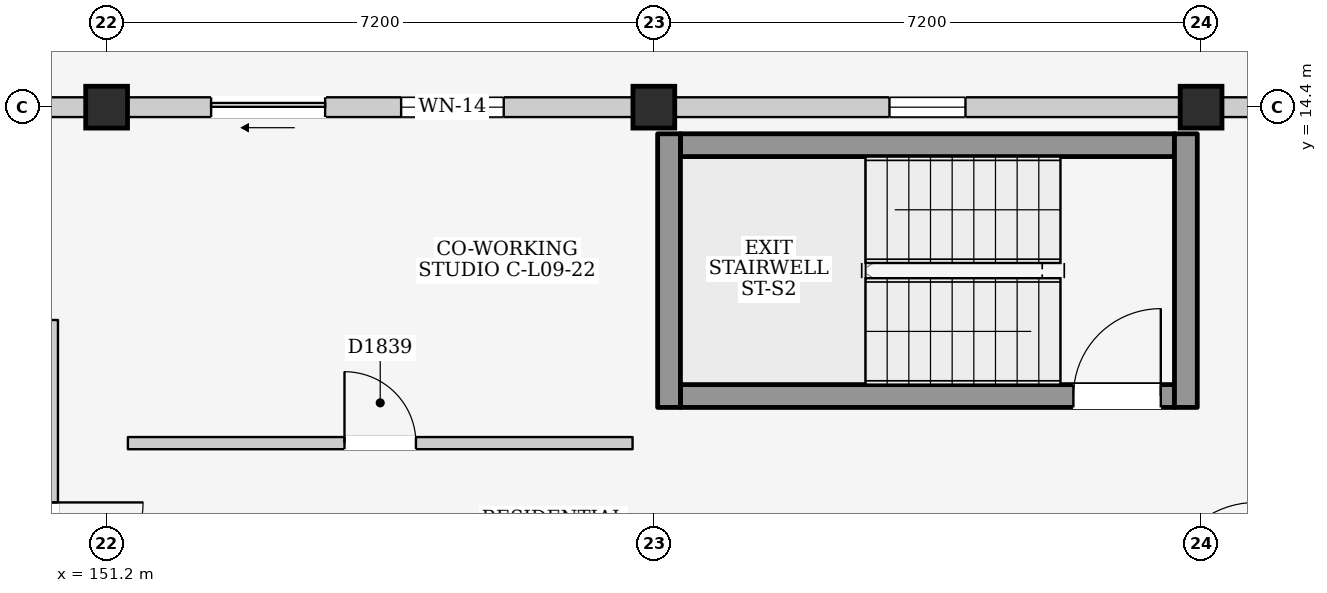
"""IFC4 building model, lengths in metres.
Left out: names, types, materials, properties, quantities, classifications, styles, units other than length and angle.
Written with IfcOpenShell. Run it as: python <this file> out.ifc"""

import sys

from ifc_helpers import new_model, si_unit, direction, frame, frame_2d, origin, origin_2d, place, context, subcontext, project, spatial, rectangle, extrude, element, fill, save


model = new_model("IFC4")
c1 = context("Model", 3, precision=1e-05, world=origin(), true_north=direction((0.0, 1.0)))
c2 = subcontext(c1, "Body", "Model", "MODEL_VIEW")
j1 = project(units=[si_unit("LENGTHUNIT", "METRE"), si_unit("PLANEANGLEUNIT", "RADIAN")], contexts=[c1])
p1 = place(None, origin())
s1 = spatial("IfcSite", under=j1, at=p1, CompositionType="ELEMENT")
p2 = place(p1, origin())
s2 = spatial("IfcBuilding", under=s1, at=p2, CompositionType="ELEMENT")
p3 = place(p2, frame((0.0, 0.0, 31.5)))
s3 = spatial("IfcBuildingStorey", under=s2, at=p3, CompositionType="ELEMENT", Elevation=31.5)
for number, where, z_axis, x_axis in (
    (1, (151.2, 14.4, 0.0), (0.0, 0.0, 1.0), (1.0, 0.0, 0.0)),
    (2, (158.4, 14.4, 0.0), (0.0, 0.0, 1.0), (1.0, 0.0, 0.0)),
    (3, (165.6, 14.4, 0.0), (0.0, 0.0, 1.0), (1.0, 0.0, 0.0)),
):
    element("IfcColumn", number, at=place(p3, frame(where, z_axis=z_axis, x_axis=x_axis)), inside=s3, PredefinedType="COLUMN", context=c2, shape_type="SweptSolid", body=[
        extrude(rectangle(XDim=0.55, YDim=0.55, at=origin_2d()), origin(), (0.0, 0.0, 1.0), 3.3),
    ])
p4 = place(p3, frame((144.275, 14.4, 0.0), z_axis=(0.0, 0.0, 1.0), x_axis=(1.0, 0.0, 0.0)))
e4 = element("IfcWall", 4, at=p4, inside=s3, PredefinedType="ELEMENTEDWALL", context=c2, shape_type="SweptSolid", body=[
    extrude(rectangle(XDim=6.65, YDim=0.26, at=frame_2d((3.325, 0.0))), origin(), (0.0, 0.0, 1.0), 2.465),
])
p5 = place(p4, frame((2.825, 0.0, 1.2)))
e5 = element("IfcOpeningElement", 5, at=p5, cuts=e4, PredefinedType="OPENING", context=c2, shape_type="SweptSolid", body=[
    extrude(rectangle(XDim=1.0, YDim=0.9, at=frame_2d((0.5, 0.45))), frame((0.0, 0.145, 0.0), z_axis=(0.0, -1.0, 0.0), x_axis=(1.0, 0.0, 0.0)), (0.0, 0.0, 1.0), 0.29),
])
p6 = place(p3, frame((151.475, 14.4, 0.0), z_axis=(0.0, 0.0, 1.0), x_axis=(1.0, 0.0, 0.0)))
e6 = element("IfcWall", 6, at=p6, inside=s3, PredefinedType="ELEMENTEDWALL", context=c2, shape_type="SweptSolid", body=[
    extrude(rectangle(XDim=6.65, YDim=0.26, at=frame_2d((3.325, 0.0))), origin(), (0.0, 0.0, 1.0), 2.465),
])
p7 = place(p6, frame((1.1, 0.0, 0.0)))
e7 = element("IfcOpeningElement", 7, at=p7, cuts=e6, PredefinedType="OPENING", context=c2, shape_type="SweptSolid", body=[
    extrude(rectangle(XDim=1.5, YDim=2.12, at=frame_2d((0.75, 1.06))), frame((0.0, 0.145, 0.0), z_axis=(0.0, -1.0, 0.0), x_axis=(1.0, 0.0, 0.0)), (0.0, 0.0, 1.0), 0.29),
])
p8 = place(p6, frame((3.6, 0.0, 0.855)))
e8 = element("IfcOpeningElement", 8, at=p8, cuts=e6, PredefinedType="OPENING", context=c2, shape_type="SweptSolid", body=[
    extrude(rectangle(XDim=1.35, YDim=1.5, at=frame_2d((0.675, 0.75))), frame((0.0, 0.145, 0.0), z_axis=(0.0, -1.0, 0.0), x_axis=(1.0, 0.0, 0.0)), (0.0, 0.0, 1.0), 0.29),
])
p9 = place(p3, frame((158.675, 14.4, 0.0), z_axis=(0.0, 0.0, 1.0), x_axis=(1.0, 0.0, 0.0)))
e9 = element("IfcWall", 9, at=p9, inside=s3, PredefinedType="ELEMENTEDWALL", context=c2, shape_type="SweptSolid", body=[
    extrude(rectangle(XDim=6.65, YDim=0.26, at=frame_2d((3.325, 0.0))), origin(), (0.0, 0.0, 1.0), 2.465),
])
p10 = place(p9, frame((2.825, 0.0, 1.2)))
e10 = element("IfcOpeningElement", 10, at=p10, cuts=e9, PredefinedType="OPENING", context=c2, shape_type="SweptSolid", body=[
    extrude(rectangle(XDim=1.0, YDim=0.9, at=frame_2d((0.5, 0.45))), frame((0.0, 0.145, 0.0), z_axis=(0.0, -1.0, 0.0), x_axis=(1.0, 0.0, 0.0)), (0.0, 0.0, 1.0), 0.29),
])
p11 = place(p3, frame((165.875, 14.4, 0.0), z_axis=(0.0, 0.0, 1.0), x_axis=(1.0, 0.0, 0.0)))
e11 = element("IfcWall", 11, at=p11, inside=s3, PredefinedType="ELEMENTEDWALL", context=c2, shape_type="SweptSolid", body=[
    extrude(rectangle(XDim=6.65, YDim=0.26, at=frame_2d((3.325, 0.0))), origin(), (0.0, 0.0, 1.0), 2.465),
])
p12 = place(p11, frame((2.825, 0.0, 1.2)))
e12 = element("IfcOpeningElement", 12, at=p12, cuts=e11, PredefinedType="OPENING", context=c2, shape_type="SweptSolid", body=[
    extrude(rectangle(XDim=1.0, YDim=0.9, at=frame_2d((0.5, 0.45))), frame((0.0, 0.145, 0.0), z_axis=(0.0, -1.0, 0.0), x_axis=(1.0, 0.0, 0.0)), (0.0, 0.0, 1.0), 0.29),
])
p13 = place(p3, frame((150.48, 7.28, 0.0), z_axis=(0.0, 0.0, 1.0), x_axis=(0.0, 1.0, 0.0)))
e13 = element("IfcWall", 13, at=p13, inside=s3, PredefinedType="PARTITIONING", context=c2, shape_type="SweptSolid", body=[
    extrude(rectangle(XDim=4.32, YDim=0.16, at=frame_2d((2.16, 0.0))), origin(), (0.0, 0.0, 1.0), 3.08),
])
p14 = place(p13, frame((0.72, 0.0, 0.0)))
e14 = element("IfcOpeningElement", 14, at=p14, cuts=e13, PredefinedType="OPENING", context=c2, shape_type="SweptSolid", body=[
    extrude(rectangle(XDim=1.2, YDim=2.2, at=frame_2d((0.6, 1.1))), frame((0.0, 0.095, 0.0), z_axis=(0.0, -1.0, 0.0), x_axis=(1.0, 0.0, 0.0)), (0.0, 0.0, 1.0), 0.19),
])
p15 = place(p3, frame((158.75, 10.6, 0.0), z_axis=(0.0, 0.0, 1.0), x_axis=(1.0, 0.0, 0.0)))
e15 = element("IfcWall", 15, at=p15, inside=s3, PredefinedType="SHEAR", context=c2, shape_type="SweptSolid", body=[
    extrude(rectangle(XDim=6.5, YDim=0.3, at=frame_2d((3.25, 0.0))), origin(), (0.0, 0.0, 1.0), 3.08),
])
p16 = place(p15, frame((5.17, 0.0, 0.0)))
e16 = element("IfcOpeningElement", 16, at=p16, cuts=e15, PredefinedType="OPENING", context=c2, shape_type="SweptSolid", body=[
    extrude(rectangle(XDim=1.15, YDim=2.2, at=frame_2d((0.575, 1.1))), frame((0.0, 0.165, 0.0), z_axis=(0.0, -1.0, 0.0), x_axis=(1.0, 0.0, 0.0)), (0.0, 0.0, 1.0), 0.33),
])
p17 = place(p3, frame((158.75, 13.9, 0.0), z_axis=(0.0, 0.0, 1.0), x_axis=(1.0, 0.0, 0.0)))
e17 = element("IfcWall", 17, at=p17, inside=s3, PredefinedType="SHEAR", context=c2, shape_type="SweptSolid", body=[
    extrude(rectangle(XDim=6.5, YDim=0.3, at=frame_2d((3.25, 0.0))), origin(), (0.0, 0.0, 1.0), 3.08),
])
for number, where, z_axis, x_axis in (
    (18, (158.6, 10.45, 0.0), (0.0, 0.0, 1.0), (0.0, 1.0, 0.0)),
    (19, (165.4, 10.45, 0.0), (0.0, 0.0, 1.0), (0.0, 1.0, 0.0)),
):
    element("IfcWall", number, at=place(p3, frame(where, z_axis=z_axis, x_axis=x_axis)), inside=s3, PredefinedType="SHEAR", context=c2, shape_type="SweptSolid", body=[
        extrude(rectangle(XDim=3.6, YDim=0.3, at=frame_2d((1.8, 0.0))), origin(), (0.0, 0.0, 1.0), 3.08),
    ])
p18 = place(p3, frame((151.48, 9.98, 0.0), z_axis=(0.0, 0.0, 1.0), x_axis=(1.0, 0.0, 0.0)))
e20 = element("IfcWall", 20, at=p18, inside=s3, PredefinedType="PARTITIONING", context=c2, shape_type="SweptSolid", body=[
    extrude(rectangle(XDim=6.64, YDim=0.16, at=frame_2d((3.32, 0.0))), origin(), (0.0, 0.0, 1.0), 3.08),
])
p19 = place(p18, frame((2.85, 0.0, 0.0)))
e21 = element("IfcOpeningElement", 21, at=p19, cuts=e20, PredefinedType="OPENING", context=c2, shape_type="SweptSolid", body=[
    extrude(rectangle(XDim=0.94, YDim=2.12, at=frame_2d((0.47, 1.06))), frame((0.0, 0.095, 0.0), z_axis=(0.0, -1.0, 0.0), x_axis=(1.0, 0.0, 0.0)), (0.0, 0.0, 1.0), 0.19),
])
p20 = place(p7, frame((1.5, 0.0, 0.0), z_axis=(0.0, 0.0, 1.0), x_axis=(-1.0, 0.0, 0.0)))
e22 = element("IfcDoor", 22, at=p20, inside=s3, OperationType="SLIDING_TO_LEFT", PredefinedType="DOOR", context=c2, shape_type="SweptSolid", body=[
    extrude(rectangle(XDim=1.5, YDim=2.12, at=frame_2d((0.75, 1.06))), frame((0.0, 0.025, 0.0), z_axis=(0.0, -1.0, 0.0), x_axis=(1.0, 0.0, 0.0)), (0.0, 0.0, 1.0), 0.05),
])
fill(e7, e22)
p21 = place(p8, origin())
e23 = element("IfcWindow", 23, at=p21, inside=s3, PartitioningType="SINGLE_PANEL", PredefinedType="WINDOW", context=c2, shape_type="SweptSolid", body=[
    extrude(rectangle(XDim=1.35, YDim=1.5, at=frame_2d((0.675, 0.75))), frame((0.0, 0.03, 0.0), z_axis=(0.0, -1.0, 0.0), x_axis=(1.0, 0.0, 0.0)), (0.0, 0.0, 1.0), 0.06),
])
fill(e8, e23)
p22 = place(p10, origin())
e24 = element("IfcWindow", 24, at=p22, inside=s3, PartitioningType="SINGLE_PANEL", PredefinedType="WINDOW", context=c2, shape_type="SweptSolid", body=[
    extrude(rectangle(XDim=1.0, YDim=0.9, at=frame_2d((0.5, 0.45))), frame((0.0, 0.03, 0.0), z_axis=(0.0, -1.0, 0.0), x_axis=(1.0, 0.0, 0.0)), (0.0, 0.0, 1.0), 0.06),
])
fill(e10, e24)
p23 = place(p14, frame((1.2, 0.0, 0.0), z_axis=(0.0, 0.0, 1.0), x_axis=(-1.0, 0.0, 0.0)))
e25 = element("IfcDoor", 25, at=p23, inside=s3, OperationType="SINGLE_SWING_LEFT", PredefinedType="DOOR", context=c2, shape_type="SweptSolid", body=[
    extrude(rectangle(XDim=1.2, YDim=2.2, at=frame_2d((0.6, 1.1))), frame((0.0, 0.025, 0.0), z_axis=(0.0, -1.0, 0.0), x_axis=(1.0, 0.0, 0.0)), (0.0, 0.0, 1.0), 0.05),
])
fill(e14, e25)
p24 = place(p16, origin())
e26 = element("IfcDoor", 26, at=p24, inside=s3, OperationType="SINGLE_SWING_RIGHT", PredefinedType="DOOR", context=c2, shape_type="SweptSolid", body=[
    extrude(rectangle(XDim=1.15, YDim=2.2, at=frame_2d((0.575, 1.1))), frame((0.0, 0.025, 0.0), z_axis=(0.0, -1.0, 0.0), x_axis=(1.0, 0.0, 0.0)), (0.0, 0.0, 1.0), 0.05),
])
fill(e16, e26)
p25 = place(p19, origin())
e27 = element("IfcDoor", 27, at=p25, inside=s3, OperationType="SINGLE_SWING_LEFT", PredefinedType="DOOR", context=c2, shape_type="SweptSolid", body=[
    extrude(rectangle(XDim=0.94, YDim=2.12, at=frame_2d((0.47, 1.06))), frame((0.0, 0.025, 0.0), z_axis=(0.0, -1.0, 0.0), x_axis=(1.0, 0.0, 0.0)), (0.0, 0.0, 1.0), 0.05),
])
fill(e21, e27)
save(model, sys.argv[1])
